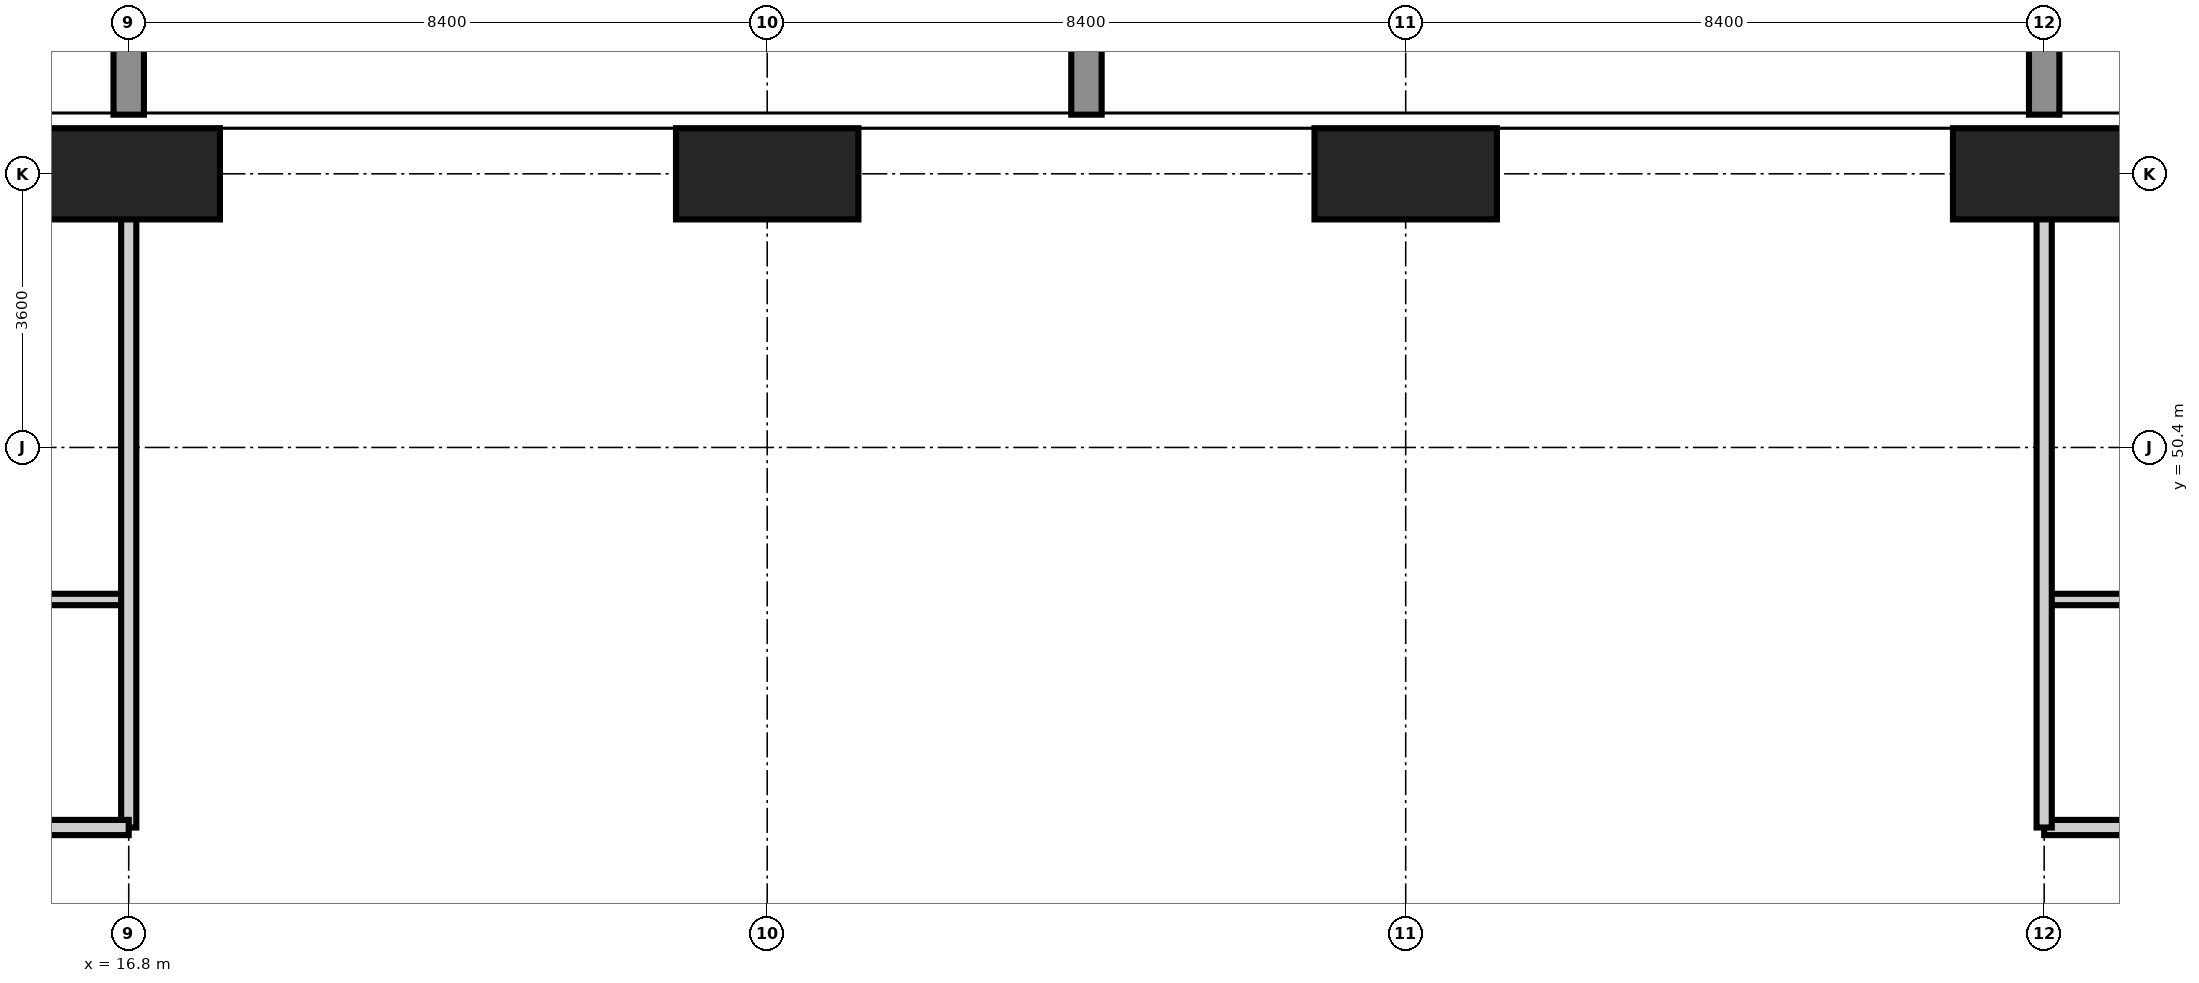
"""IFC4 building model, lengths in metres.
Left out: names, types, materials, properties, quantities, classifications, styles, units other than length and angle.
Written with IfcOpenShell. Run it as: python <this file> out.ifc"""

import sys

from ifc_helpers import new_model, si_unit, direction, frame, frame_2d, origin, origin_2d, place, context, subcontext, project, spatial, rectangle, extrude, element, save


model = new_model("IFC4")
c1 = context("Model", 3, precision=1e-05, world=origin(), true_north=direction((0.0, 1.0)))
c2 = subcontext(c1, "Body", "Model", "MODEL_VIEW")
j1 = project(units=[si_unit("LENGTHUNIT", "METRE"), si_unit("PLANEANGLEUNIT", "RADIAN")], contexts=[c1])
p1 = place(None, origin())
s1 = spatial("IfcSite", under=j1, at=p1, CompositionType="ELEMENT")
p2 = place(p1, origin())
s2 = spatial("IfcBuilding", under=s1, at=p2, CompositionType="ELEMENT")
p3 = place(p2, frame((0.0, 0.0, 180.6)))
s3 = spatial("IfcBuildingStorey", under=s2, at=p3, CompositionType="ELEMENT", Elevation=180.6)
for number, where, z_axis, x_axis in (
    (1, (16.8, 54.0, -0.35), (0.0, 0.0, 1.0), (1.0, 0.0, 0.0)),
    (2, (25.2, 54.0, -0.35), (0.0, 0.0, 1.0), (1.0, 0.0, 0.0)),
    (3, (33.6, 54.0, -0.35), (0.0, 0.0, 1.0), (1.0, 0.0, 0.0)),
    (4, (42.0, 54.0, -0.35), (0.0, 0.0, 1.0), (1.0, 0.0, 0.0)),
):
    element("IfcColumn", number, at=place(p3, frame(where, z_axis=z_axis, x_axis=x_axis)), inside=s3, PredefinedType="COLUMN", context=c2, shape_type="SweptSolid", body=[
        extrude(rectangle(XDim=2.4, YDim=1.2, at=origin_2d()), origin(), (0.0, 0.0, 1.0), 3.6),
    ])
p4 = place(p3, frame((14.6, 48.4, 0.0), z_axis=(0.0, 0.0, 1.0), x_axis=(1.0, 0.0, 0.0)))
e5 = element("IfcWall", 5, at=p4, inside=s3, PredefinedType="PARTITIONING", context=c2, shape_type="SweptSolid", body=[
    extrude(rectangle(XDim=2.2, YDim=0.15, at=frame_2d((1.1, 0.0))), origin(), (0.0, 0.0, 1.0), 3.25),
])
p5 = place(p3, frame((42.0, 48.4, 0.0), z_axis=(0.0, 0.0, 1.0), x_axis=(1.0, 0.0, 0.0)))
e6 = element("IfcWall", 6, at=p5, inside=s3, PredefinedType="PARTITIONING", context=c2, shape_type="SweptSolid", body=[
    extrude(rectangle(XDim=2.8, YDim=0.15, at=frame_2d((1.4, 0.0))), origin(), (0.0, 0.0, 1.0), 3.25),
])
p6 = place(p3, frame((16.8, 45.4, 0.0), z_axis=(0.0, 0.0, 1.0), x_axis=(0.0, 1.0, 0.0)))
e7 = element("IfcWall", 7, at=p6, inside=s3, PredefinedType="PARTITIONING", context=c2, shape_type="SweptSolid", body=[
    extrude(rectangle(XDim=9.218, YDim=0.2, at=frame_2d((4.609, 0.0))), origin(), (0.0, 0.0, 1.0), 3.25),
])
p7 = place(p3, frame((14.6, 45.4, 0.0), z_axis=(0.0, 0.0, 1.0), x_axis=(1.0, 0.0, 0.0)))
e8 = element("IfcWall", 8, at=p7, inside=s3, PredefinedType="PARTITIONING", context=c2, shape_type="SweptSolid", body=[
    extrude(rectangle(XDim=2.2, YDim=0.2, at=frame_2d((1.1, 0.0))), origin(), (0.0, 0.0, 1.0), 3.25),
])
p8 = place(p3, frame((42.0, 45.4, 0.0), z_axis=(0.0, 0.0, 1.0), x_axis=(1.0, 0.0, 0.0)))
e9 = element("IfcWall", 9, at=p8, inside=s3, PredefinedType="PARTITIONING", context=c2, shape_type="SweptSolid", body=[
    extrude(rectangle(XDim=2.8, YDim=0.2, at=frame_2d((1.4, 0.0))), origin(), (0.0, 0.0, 1.0), 3.25),
])
p9 = place(p3, frame((42.0, 54.618, 0.0), z_axis=(0.0, 0.0, 1.0), x_axis=(0.0, -1.0, 0.0)))
e10 = element("IfcWall", 10, at=p9, inside=s3, PredefinedType="PARTITIONING", context=c2, shape_type="SweptSolid", body=[
    extrude(rectangle(XDim=9.218, YDim=0.2, at=frame_2d((4.609, 0.0))), origin(), (0.0, 0.0, 1.0), 3.25),
])
save(model, sys.argv[1])
